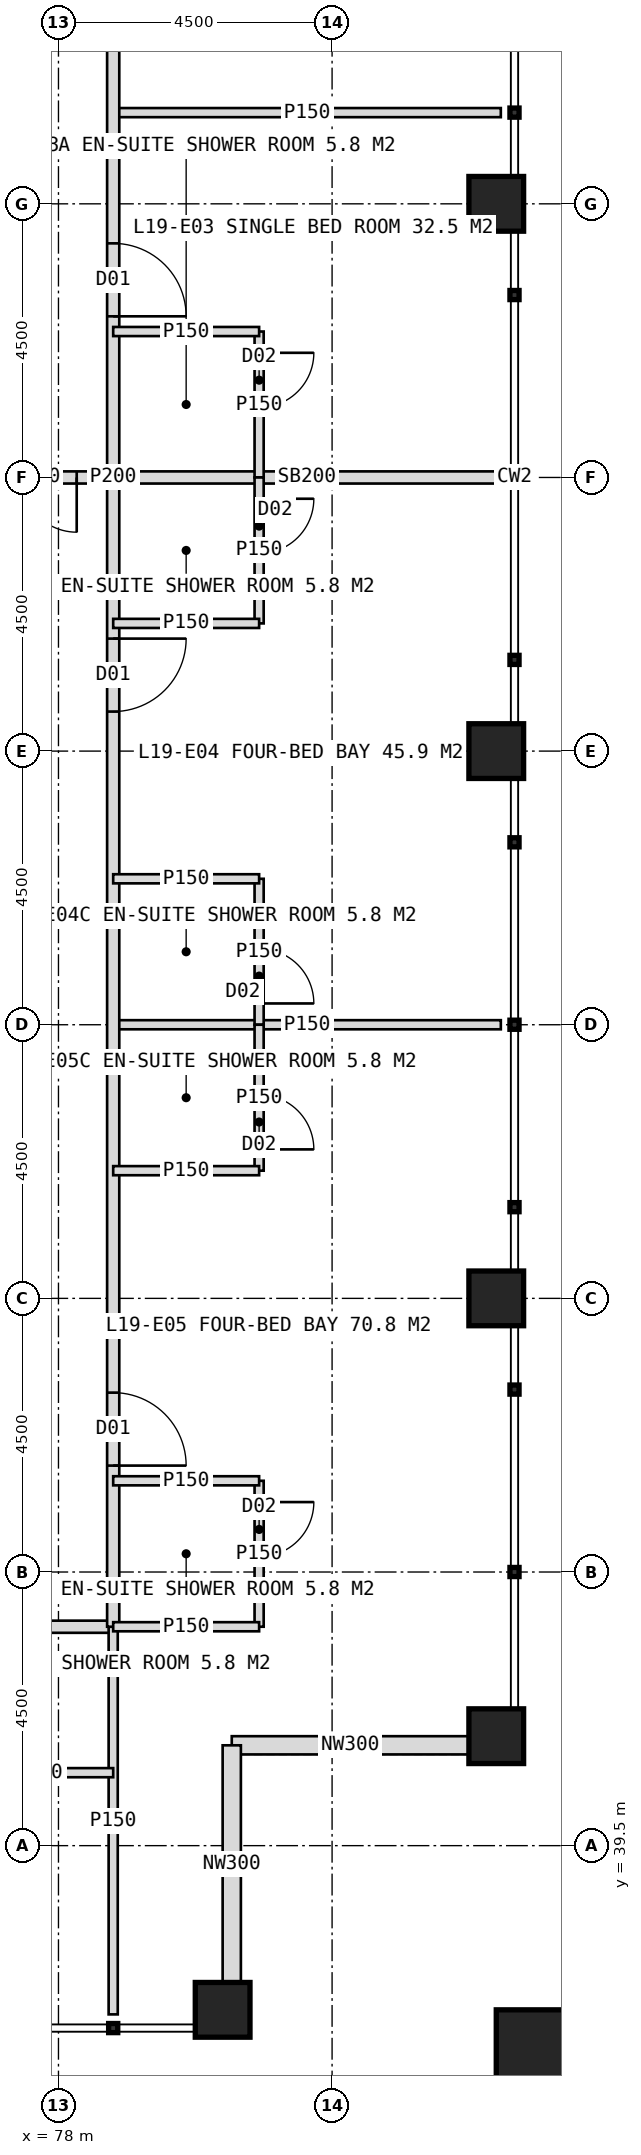
"""IFC4 building model, lengths in metres.
Left out: names, types, materials, properties, quantities, classifications, styles, units other than length and angle.
Written with IfcOpenShell. Run it as: python <this file> out.ifc"""

import sys

from ifc_helpers import new_model, si_unit, direction, frame, frame_2d, origin, origin_2d, place, context, subcontext, project, spatial, rectangle, hollow_rectangle, extrude, element, fill, save


model = new_model("IFC4")
c1 = context("Model", 3, precision=1e-05, world=origin(), true_north=direction((0.0, 1.0)))
c2 = subcontext(c1, "Body", "Model", "MODEL_VIEW")
j1 = project(units=[si_unit("LENGTHUNIT", "METRE"), si_unit("PLANEANGLEUNIT", "RADIAN")], contexts=[c1])
p1 = place(None, origin())
s1 = spatial("IfcSite", under=j1, at=p1, CompositionType="ELEMENT")
p2 = place(p1, origin())
s2 = spatial("IfcBuilding", under=s1, at=p2, CompositionType="ELEMENT")
p3 = place(p2, frame((0.0, 0.0, 83.0)))
s3 = spatial("IfcBuildingStorey", under=s2, at=p3, CompositionType="ELEMENT", Elevation=83.0)
for number, where, z_axis, x_axis in (
    (1, (85.2, 41.3, 0.0), (0.0, 0.0, 1.0), (1.0, 0.0, 0.0)),
    (2, (85.2, 48.5, 0.0), (0.0, 0.0, 1.0), (1.0, 0.0, 0.0)),
    (3, (85.2, 57.5, 0.0), (0.0, 0.0, 1.0), (1.0, 0.0, 0.0)),
    (4, (85.2, 66.5, 0.0), (0.0, 0.0, 1.0), (1.0, 0.0, 0.0)),
    (5, (80.7, 36.8, 0.0), (0.0, 0.0, 1.0), (1.0, 0.0, 0.0)),
):
    element("IfcColumn", number, at=place(p3, frame(where, z_axis=z_axis, x_axis=x_axis)), inside=s3, PredefinedType="COLUMN", context=c2, shape_type="SweptSolid", body=[
        extrude(hollow_rectangle(XDim=0.9, YDim=0.9, WallThickness=0.08, at=origin_2d()), origin(), (0.0, 0.0, 1.0), 4.0),
    ])
p4 = place(p3, frame((86.1, 35.9, 0.0), z_axis=(0.0, 0.0, 1.0), x_axis=(1.0, 0.0, 0.0)))
e6 = element("IfcColumn", 6, at=p4, inside=s3, PredefinedType="COLUMN", context=c2, shape_type="SweptSolid", body=[
    extrude(hollow_rectangle(XDim=1.8, YDim=1.8, WallThickness=0.1, at=origin_2d()), origin(), (0.0, 0.0, 1.0), 4.0),
])
for number, where, z_axis, x_axis in (
    (7, (84.75, 41.15, 0.0), (0.0, 0.0, 1.0), (-1.0, 0.0, 0.0)),
    (8, (80.85, 41.15, 0.0), (0.0, 0.0, 1.0), (0.0, -1.0, 0.0)),
):
    element("IfcWall", number, at=place(p3, frame(where, z_axis=z_axis, x_axis=x_axis)), inside=s3, PredefinedType="ELEMENTEDWALL", context=c2, shape_type="SweptSolid", body=[
        extrude(rectangle(XDim=3.9, YDim=0.3, at=frame_2d((1.95, 0.0))), origin(), (0.0, 0.0, 1.0), 2.95),
    ])
p5 = place(p3, frame((78.9, 43.1, 0.0), z_axis=(0.0, 0.0, 1.0), x_axis=(-1.0, 0.0, 0.0)))
e9 = element("IfcWall", 9, at=p5, inside=s3, PredefinedType="PARTITIONING", context=c2, shape_type="SweptSolid", body=[
    extrude(rectangle(XDim=37.8, YDim=0.2, at=frame_2d((18.9, 0.0))), origin(), (0.0, 0.0, 1.0), 3.75),
])
p6 = place(p5, frame((6.05, 0.0, 0.0)))
e10 = element("IfcOpeningElement", 10, at=p6, cuts=e9, PredefinedType="OPENING", context=c2, shape_type="SweptSolid", body=[
    extrude(rectangle(XDim=1.2, YDim=2.2, at=frame_2d((0.6, 1.1))), frame((0.0, 0.11, 0.0), z_axis=(0.0, -1.0, 0.0), x_axis=(1.0, 0.0, 0.0)), (0.0, 0.0, 1.0), 0.22),
])
p7 = place(p5, frame((12.55, 0.0, 0.0)))
e11 = element("IfcOpeningElement", 11, at=p7, cuts=e9, PredefinedType="OPENING", context=c2, shape_type="SweptSolid", body=[
    extrude(rectangle(XDim=1.2, YDim=2.2, at=frame_2d((0.6, 1.1))), frame((0.0, 0.11, 0.0), z_axis=(0.0, -1.0, 0.0), x_axis=(1.0, 0.0, 0.0)), (0.0, 0.0, 1.0), 0.22),
])
p8 = place(p5, frame((21.05, 0.0, 0.0)))
e12 = element("IfcOpeningElement", 12, at=p8, cuts=e9, PredefinedType="OPENING", context=c2, shape_type="SweptSolid", body=[
    extrude(rectangle(XDim=1.2, YDim=2.2, at=frame_2d((0.6, 1.1))), frame((0.0, 0.11, 0.0), z_axis=(0.0, -1.0, 0.0), x_axis=(1.0, 0.0, 0.0)), (0.0, 0.0, 1.0), 0.22),
])
p9 = place(p5, frame((27.55, 0.0, 0.0)))
e13 = element("IfcOpeningElement", 13, at=p9, cuts=e9, PredefinedType="OPENING", context=c2, shape_type="SweptSolid", body=[
    extrude(rectangle(XDim=1.2, YDim=2.2, at=frame_2d((0.6, 1.1))), frame((0.0, 0.11, 0.0), z_axis=(0.0, -1.0, 0.0), x_axis=(1.0, 0.0, 0.0)), (0.0, 0.0, 1.0), 0.22),
])
p10 = place(p3, frame((78.9, 43.1, 0.0), z_axis=(0.0, 0.0, 1.0), x_axis=(0.0, -1.0, 0.0)))
e14 = element("IfcWall", 14, at=p10, inside=s3, PredefinedType="PARTITIONING", context=c2, shape_type="SweptSolid", body=[
    extrude(rectangle(XDim=6.375, YDim=0.15, at=frame_2d((3.188, 0.0))), origin(), (0.0, 0.0, 1.0), 3.75),
])
p11 = place(p3, frame((78.9, 40.7, 0.0), z_axis=(0.0, 0.0, 1.0), x_axis=(-1.0, 0.0, 0.0)))
e15 = element("IfcWall", 15, at=p11, inside=s3, PredefinedType="PARTITIONING", context=c2, shape_type="SweptSolid", body=[
    extrude(rectangle(XDim=2.4, YDim=0.15, at=frame_2d((1.2, 0.0))), origin(), (0.0, 0.0, 1.0), 3.75),
])
p12 = place(p11, frame((1.15, 0.0, 0.0)))
e16 = element("IfcOpeningElement", 16, at=p12, cuts=e15, PredefinedType="OPENING", context=c2, shape_type="SweptSolid", body=[
    extrude(rectangle(XDim=0.9, YDim=2.1, at=frame_2d((0.45, 1.05))), frame((0.0, 0.085, 0.0), z_axis=(0.0, -1.0, 0.0), x_axis=(1.0, 0.0, 0.0)), (0.0, 0.0, 1.0), 0.17),
])
p13 = place(p3, frame((78.9, 68.0, 0.0), z_axis=(0.0, 0.0, 1.0), x_axis=(1.0, 0.0, 0.0)))
e17 = element("IfcWall", 17, at=p13, inside=s3, PredefinedType="PARTITIONING", context=c2, shape_type="SweptSolid", body=[
    extrude(rectangle(XDim=6.375, YDim=0.15, at=frame_2d((3.188, 0.0))), origin(), (0.0, 0.0, 1.0), 3.75),
])
p14 = place(p3, frame((78.9, 62.0, 0.0), z_axis=(0.0, 0.0, 1.0), x_axis=(1.0, 0.0, 0.0)))
e18 = element("IfcWall", 18, at=p14, inside=s3, PredefinedType="SOLIDWALL", context=c2, shape_type="SweptSolid", body=[
    extrude(rectangle(XDim=6.375, YDim=0.2, at=frame_2d((3.188, 0.0))), origin(), (0.0, 0.0, 1.0), 2.75),
])
p15 = place(p3, frame((78.9, 53.0, 0.0), z_axis=(0.0, 0.0, 1.0), x_axis=(1.0, 0.0, 0.0)))
e19 = element("IfcWall", 19, at=p15, inside=s3, PredefinedType="PARTITIONING", context=c2, shape_type="SweptSolid", body=[
    extrude(rectangle(XDim=6.375, YDim=0.15, at=frame_2d((3.188, 0.0))), origin(), (0.0, 0.0, 1.0), 3.75),
])
p16 = place(p3, frame((78.9, 80.9, 0.0), z_axis=(0.0, 0.0, 1.0), x_axis=(0.0, -1.0, 0.0)))
e20 = element("IfcWall", 20, at=p16, inside=s3, PredefinedType="PARTITIONING", context=c2, shape_type="SweptSolid", body=[
    extrude(rectangle(XDim=37.8, YDim=0.2, at=frame_2d((18.9, 0.0))), origin(), (0.0, 0.0, 1.0), 3.75),
])
p17 = place(p16, frame((2.45, 0.0, 0.0)))
e21 = element("IfcOpeningElement", 21, at=p17, cuts=e20, PredefinedType="OPENING", context=c2, shape_type="SweptSolid", body=[
    extrude(rectangle(XDim=1.2, YDim=2.2, at=frame_2d((0.6, 1.1))), frame((0.0, 0.11, 0.0), z_axis=(0.0, -1.0, 0.0), x_axis=(1.0, 0.0, 0.0)), (0.0, 0.0, 1.0), 0.22),
])
p18 = place(p16, frame((9.55, 0.0, 0.0)))
e22 = element("IfcOpeningElement", 22, at=p18, cuts=e20, PredefinedType="OPENING", context=c2, shape_type="SweptSolid", body=[
    extrude(rectangle(XDim=1.2, YDim=2.2, at=frame_2d((0.6, 1.1))), frame((0.0, 0.11, 0.0), z_axis=(0.0, -1.0, 0.0), x_axis=(1.0, 0.0, 0.0)), (0.0, 0.0, 1.0), 0.22),
])
p19 = place(p16, frame((15.05, 0.0, 0.0)))
e23 = element("IfcOpeningElement", 23, at=p19, cuts=e20, PredefinedType="OPENING", context=c2, shape_type="SweptSolid", body=[
    extrude(rectangle(XDim=1.2, YDim=2.2, at=frame_2d((0.6, 1.1))), frame((0.0, 0.11, 0.0), z_axis=(0.0, -1.0, 0.0), x_axis=(1.0, 0.0, 0.0)), (0.0, 0.0, 1.0), 0.22),
])
p20 = place(p16, frame((21.55, 0.0, 0.0)))
e24 = element("IfcOpeningElement", 24, at=p20, cuts=e20, PredefinedType="OPENING", context=c2, shape_type="SweptSolid", body=[
    extrude(rectangle(XDim=1.2, YDim=2.2, at=frame_2d((0.6, 1.1))), frame((0.0, 0.11, 0.0), z_axis=(0.0, -1.0, 0.0), x_axis=(1.0, 0.0, 0.0)), (0.0, 0.0, 1.0), 0.22),
])
p21 = place(p16, frame((33.95, 0.0, 0.0)))
e25 = element("IfcOpeningElement", 25, at=p21, cuts=e20, PredefinedType="OPENING", context=c2, shape_type="SweptSolid", body=[
    extrude(rectangle(XDim=1.2, YDim=2.2, at=frame_2d((0.6, 1.1))), frame((0.0, 0.11, 0.0), z_axis=(0.0, -1.0, 0.0), x_axis=(1.0, 0.0, 0.0)), (0.0, 0.0, 1.0), 0.22),
])
p22 = place(p3, frame((81.3, 64.4, 0.0), z_axis=(0.0, 0.0, 1.0), x_axis=(0.0, -1.0, 0.0)))
e26 = element("IfcWall", 26, at=p22, inside=s3, PredefinedType="PARTITIONING", context=c2, shape_type="SweptSolid", body=[
    extrude(rectangle(XDim=2.4, YDim=0.15, at=frame_2d((1.2, 0.0))), origin(), (0.0, 0.0, 1.0), 3.75),
])
p23 = place(p22, frame((0.35, 0.0, 0.0)))
e27 = element("IfcOpeningElement", 27, at=p23, cuts=e26, PredefinedType="OPENING", context=c2, shape_type="SweptSolid", body=[
    extrude(rectangle(XDim=0.9, YDim=2.1, at=frame_2d((0.45, 1.05))), frame((0.0, 0.085, 0.0), z_axis=(0.0, -1.0, 0.0), x_axis=(1.0, 0.0, 0.0)), (0.0, 0.0, 1.0), 0.17),
])
p24 = place(p3, frame((78.9, 64.4, 0.0), z_axis=(0.0, 0.0, 1.0), x_axis=(1.0, 0.0, 0.0)))
e28 = element("IfcWall", 28, at=p24, inside=s3, PredefinedType="PARTITIONING", context=c2, shape_type="SweptSolid", body=[
    extrude(rectangle(XDim=2.4, YDim=0.15, at=frame_2d((1.2, 0.0))), origin(), (0.0, 0.0, 1.0), 3.75),
])
p25 = place(p3, frame((81.3, 62.0, 0.0), z_axis=(0.0, 0.0, 1.0), x_axis=(0.0, -1.0, 0.0)))
e29 = element("IfcWall", 29, at=p25, inside=s3, PredefinedType="PARTITIONING", context=c2, shape_type="SweptSolid", body=[
    extrude(rectangle(XDim=2.4, YDim=0.15, at=frame_2d((1.2, 0.0))), origin(), (0.0, 0.0, 1.0), 3.75),
])
p26 = place(p25, frame((0.35, 0.0, 0.0)))
e30 = element("IfcOpeningElement", 30, at=p26, cuts=e29, PredefinedType="OPENING", context=c2, shape_type="SweptSolid", body=[
    extrude(rectangle(XDim=0.9, YDim=2.1, at=frame_2d((0.45, 1.05))), frame((0.0, 0.085, 0.0), z_axis=(0.0, -1.0, 0.0), x_axis=(1.0, 0.0, 0.0)), (0.0, 0.0, 1.0), 0.17),
])
p27 = place(p3, frame((78.9, 59.6, 0.0), z_axis=(0.0, 0.0, 1.0), x_axis=(1.0, 0.0, 0.0)))
e31 = element("IfcWall", 31, at=p27, inside=s3, PredefinedType="PARTITIONING", context=c2, shape_type="SweptSolid", body=[
    extrude(rectangle(XDim=2.4, YDim=0.15, at=frame_2d((1.2, 0.0))), origin(), (0.0, 0.0, 1.0), 3.75),
])
p28 = place(p3, frame((81.3, 55.4, 0.0), z_axis=(0.0, 0.0, 1.0), x_axis=(0.0, -1.0, 0.0)))
e32 = element("IfcWall", 32, at=p28, inside=s3, PredefinedType="PARTITIONING", context=c2, shape_type="SweptSolid", body=[
    extrude(rectangle(XDim=2.4, YDim=0.15, at=frame_2d((1.2, 0.0))), origin(), (0.0, 0.0, 1.0), 3.75),
])
p29 = place(p28, frame((1.15, 0.0, 0.0)))
e33 = element("IfcOpeningElement", 33, at=p29, cuts=e32, PredefinedType="OPENING", context=c2, shape_type="SweptSolid", body=[
    extrude(rectangle(XDim=0.9, YDim=2.1, at=frame_2d((0.45, 1.05))), frame((0.0, 0.085, 0.0), z_axis=(0.0, -1.0, 0.0), x_axis=(1.0, 0.0, 0.0)), (0.0, 0.0, 1.0), 0.17),
])
p30 = place(p3, frame((78.9, 55.4, 0.0), z_axis=(0.0, 0.0, 1.0), x_axis=(1.0, 0.0, 0.0)))
e34 = element("IfcWall", 34, at=p30, inside=s3, PredefinedType="PARTITIONING", context=c2, shape_type="SweptSolid", body=[
    extrude(rectangle(XDim=2.4, YDim=0.15, at=frame_2d((1.2, 0.0))), origin(), (0.0, 0.0, 1.0), 3.75),
])
p31 = place(p3, frame((81.3, 45.5, 0.0), z_axis=(0.0, 0.0, 1.0), x_axis=(0.0, -1.0, 0.0)))
e35 = element("IfcWall", 35, at=p31, inside=s3, PredefinedType="PARTITIONING", context=c2, shape_type="SweptSolid", body=[
    extrude(rectangle(XDim=2.4, YDim=0.15, at=frame_2d((1.2, 0.0))), origin(), (0.0, 0.0, 1.0), 3.75),
])
p32 = place(p31, frame((0.35, 0.0, 0.0)))
e36 = element("IfcOpeningElement", 36, at=p32, cuts=e35, PredefinedType="OPENING", context=c2, shape_type="SweptSolid", body=[
    extrude(rectangle(XDim=0.9, YDim=2.1, at=frame_2d((0.45, 1.05))), frame((0.0, 0.085, 0.0), z_axis=(0.0, -1.0, 0.0), x_axis=(1.0, 0.0, 0.0)), (0.0, 0.0, 1.0), 0.17),
])
p33 = place(p3, frame((78.9, 45.5, 0.0), z_axis=(0.0, 0.0, 1.0), x_axis=(1.0, 0.0, 0.0)))
e37 = element("IfcWall", 37, at=p33, inside=s3, PredefinedType="PARTITIONING", context=c2, shape_type="SweptSolid", body=[
    extrude(rectangle(XDim=2.4, YDim=0.15, at=frame_2d((1.2, 0.0))), origin(), (0.0, 0.0, 1.0), 3.75),
])
p34 = place(p3, frame((81.3, 53.0, 0.0), z_axis=(0.0, 0.0, 1.0), x_axis=(0.0, -1.0, 0.0)))
e38 = element("IfcWall", 38, at=p34, inside=s3, PredefinedType="PARTITIONING", context=c2, shape_type="SweptSolid", body=[
    extrude(rectangle(XDim=2.4, YDim=0.15, at=frame_2d((1.2, 0.0))), origin(), (0.0, 0.0, 1.0), 3.75),
])
p35 = place(p34, frame((1.15, 0.0, 0.0)))
e39 = element("IfcOpeningElement", 39, at=p35, cuts=e38, PredefinedType="OPENING", context=c2, shape_type="SweptSolid", body=[
    extrude(rectangle(XDim=0.9, YDim=2.1, at=frame_2d((0.45, 1.05))), frame((0.0, 0.085, 0.0), z_axis=(0.0, -1.0, 0.0), x_axis=(1.0, 0.0, 0.0)), (0.0, 0.0, 1.0), 0.17),
])
for number, where, z_axis, x_axis in (
    (40, (78.9, 50.6, 0.0), (0.0, 0.0, 1.0), (1.0, 0.0, 0.0)),
    (41, (78.9, 43.1, 0.0), (0.0, 0.0, 1.0), (1.0, 0.0, 0.0)),
):
    element("IfcWall", number, at=place(p3, frame(where, z_axis=z_axis, x_axis=x_axis)), inside=s3, PredefinedType="PARTITIONING", context=c2, shape_type="SweptSolid", body=[
        extrude(rectangle(XDim=2.4, YDim=0.15, at=frame_2d((1.2, 0.0))), origin(), (0.0, 0.0, 1.0), 3.75),
    ])
p36 = place(p3, frame((76.2, 62.0, 0.0), z_axis=(0.0, 0.0, 1.0), x_axis=(1.0, 0.0, 0.0)))
e42 = element("IfcWall", 42, at=p36, inside=s3, PredefinedType="SOLIDWALL", context=c2, shape_type="SweptSolid", body=[
    extrude(rectangle(XDim=2.7, YDim=0.2, at=frame_2d((1.35, 0.0))), origin(), (0.0, 0.0, 1.0), 2.75),
])
p37 = place(p36, frame((0.3, 0.0, 0.0)))
e43 = element("IfcOpeningElement", 43, at=p37, cuts=e42, PredefinedType="OPENING", context=c2, shape_type="SweptSolid", body=[
    extrude(rectangle(XDim=1.8, YDim=2.2, at=frame_2d((0.9, 1.1))), frame((0.0, 0.11, 0.0), z_axis=(0.0, -1.0, 0.0), x_axis=(1.0, 0.0, 0.0)), (0.0, 0.0, 1.0), 0.22),
])
p38 = place(p19, origin())
e44 = element("IfcDoor", 44, at=p38, inside=s3, OperationType="SINGLE_SWING_RIGHT", PredefinedType="DOOR", context=c2, shape_type="SweptSolid", body=[
    extrude(rectangle(XDim=1.2, YDim=2.2, at=frame_2d((0.6, 1.1))), frame((0.0, 0.025, 0.0), z_axis=(0.0, -1.0, 0.0), x_axis=(1.0, 0.0, 0.0)), (0.0, 0.0, 1.0), 0.05),
])
fill(e23, e44)
p39 = place(p23, origin())
e45 = element("IfcDoor", 45, at=p39, inside=s3, OperationType="SINGLE_SWING_LEFT", PredefinedType="DOOR", context=c2, shape_type="SweptSolid", body=[
    extrude(rectangle(XDim=0.9, YDim=2.1, at=frame_2d((0.45, 1.05))), frame((0.0, 0.025, 0.0), z_axis=(0.0, -1.0, 0.0), x_axis=(1.0, 0.0, 0.0)), (0.0, 0.0, 1.0), 0.05),
])
fill(e27, e45)
p40 = place(p20, origin())
e46 = element("IfcDoor", 46, at=p40, inside=s3, OperationType="SINGLE_SWING_LEFT", PredefinedType="DOOR", context=c2, shape_type="SweptSolid", body=[
    extrude(rectangle(XDim=1.2, YDim=2.2, at=frame_2d((0.6, 1.1))), frame((0.0, 0.025, 0.0), z_axis=(0.0, -1.0, 0.0), x_axis=(1.0, 0.0, 0.0)), (0.0, 0.0, 1.0), 0.05),
])
fill(e24, e46)
p41 = place(p26, origin())
e47 = element("IfcDoor", 47, at=p41, inside=s3, OperationType="SINGLE_SWING_LEFT", PredefinedType="DOOR", context=c2, shape_type="SweptSolid", body=[
    extrude(rectangle(XDim=0.9, YDim=2.1, at=frame_2d((0.45, 1.05))), frame((0.0, 0.025, 0.0), z_axis=(0.0, -1.0, 0.0), x_axis=(1.0, 0.0, 0.0)), (0.0, 0.0, 1.0), 0.05),
])
fill(e30, e47)
p42 = place(p29, origin())
e48 = element("IfcDoor", 48, at=p42, inside=s3, OperationType="SINGLE_SWING_RIGHT", PredefinedType="DOOR", context=c2, shape_type="SweptSolid", body=[
    extrude(rectangle(XDim=0.9, YDim=2.1, at=frame_2d((0.45, 1.05))), frame((0.0, 0.025, 0.0), z_axis=(0.0, -1.0, 0.0), x_axis=(1.0, 0.0, 0.0)), (0.0, 0.0, 1.0), 0.05),
])
fill(e33, e48)
p43 = place(p21, origin())
e49 = element("IfcDoor", 49, at=p43, inside=s3, OperationType="SINGLE_SWING_RIGHT", PredefinedType="DOOR", context=c2, shape_type="SweptSolid", body=[
    extrude(rectangle(XDim=1.2, YDim=2.2, at=frame_2d((0.6, 1.1))), frame((0.0, 0.025, 0.0), z_axis=(0.0, -1.0, 0.0), x_axis=(1.0, 0.0, 0.0)), (0.0, 0.0, 1.0), 0.05),
])
fill(e25, e49)
p44 = place(p32, origin())
e50 = element("IfcDoor", 50, at=p44, inside=s3, OperationType="SINGLE_SWING_LEFT", PredefinedType="DOOR", context=c2, shape_type="SweptSolid", body=[
    extrude(rectangle(XDim=0.9, YDim=2.1, at=frame_2d((0.45, 1.05))), frame((0.0, 0.025, 0.0), z_axis=(0.0, -1.0, 0.0), x_axis=(1.0, 0.0, 0.0)), (0.0, 0.0, 1.0), 0.05),
])
fill(e36, e50)
p45 = place(p35, origin())
e51 = element("IfcDoor", 51, at=p45, inside=s3, OperationType="SINGLE_SWING_RIGHT", PredefinedType="DOOR", context=c2, shape_type="SweptSolid", body=[
    extrude(rectangle(XDim=0.9, YDim=2.1, at=frame_2d((0.45, 1.05))), frame((0.0, 0.025, 0.0), z_axis=(0.0, -1.0, 0.0), x_axis=(1.0, 0.0, 0.0)), (0.0, 0.0, 1.0), 0.05),
])
fill(e39, e51)
p46 = place(p37, origin())
e52 = element("IfcDoor", 52, at=p46, inside=s3, OperationType="DOUBLE_DOOR_DOUBLE_SWING", PredefinedType="DOOR", context=c2, shape_type="SweptSolid", body=[
    extrude(rectangle(XDim=1.8, YDim=2.2, at=frame_2d((0.9, 1.1))), frame((0.0, 0.025, 0.0), z_axis=(0.0, -1.0, 0.0), x_axis=(1.0, 0.0, 0.0)), (0.0, 0.0, 1.0), 0.05),
])
fill(e43, e52)
save(model, sys.argv[1])
